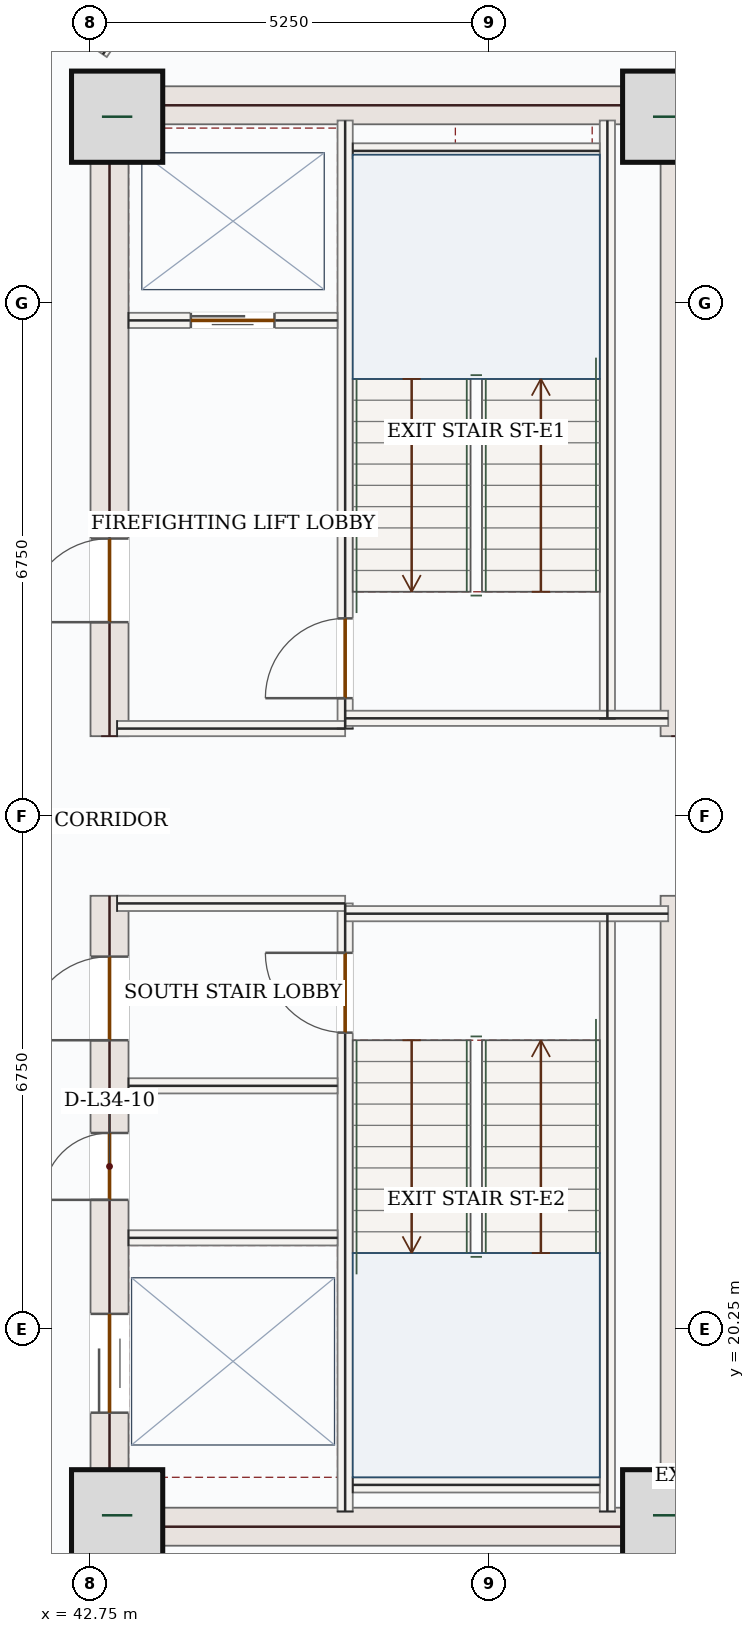
"""IFC4 building model, lengths in metres.
Left out: names, types, materials, properties, quantities, classifications, styles, units other than length and angle.
Written with IfcOpenShell. Run it as: python <this file> out.ifc"""

import sys

from ifc_helpers import new_model, si_unit, direction, frame, frame_2d, origin, origin_2d, place, context, subcontext, project, spatial, rectangle, extrude, source, transform, mapped, element, fill, save


model = new_model("IFC4")
c1 = context("Model", 3, precision=1e-05, world=origin(), true_north=direction((0.0, 1.0)))
c2 = subcontext(c1, "Body", "Model", "MODEL_VIEW")
j1 = project(units=[si_unit("LENGTHUNIT", "METRE"), si_unit("PLANEANGLEUNIT", "RADIAN")], contexts=[c1])
p1 = place(None, origin())
s1 = spatial("IfcSite", under=j1, at=p1, CompositionType="ELEMENT")
p2 = place(p1, origin())
s2 = spatial("IfcBuilding", under=s1, at=p2, CompositionType="ELEMENT")
p3 = place(p2, frame((0.0, 0.0, 151.2)))
s3 = spatial("IfcBuildingStorey", under=s2, at=p3, CompositionType="ELEMENT", Elevation=151.2)
p4 = place(p3, frame((43.0, 17.4, 0.0), z_axis=(0.0, 0.0, 1.0), x_axis=(0.0, 1.0, 0.0)))
e1 = element("IfcWall", 1, at=p4, inside=s3, PredefinedType="SHEAR", context=c2, shape_type="SweptSolid", body=[
    extrude(rectangle(XDim=8.55, YDim=0.5, at=frame_2d((4.275, 0.0))), origin(), (0.0, 0.0, 1.0), 3.62),
])
p5 = place(p4, frame((6.65, 0.0, 0.0)))
e2 = element("IfcOpeningElement", 2, at=p5, cuts=e1, PredefinedType="OPENING", context=c2, shape_type="SweptSolid", body=[
    extrude(rectangle(XDim=1.1, YDim=2.2, at=frame_2d((0.55, 1.1))), frame((0.0, 0.26, 0.0), z_axis=(0.0, -1.0, 0.0), x_axis=(1.0, 0.0, 0.0)), (0.0, 0.0, 1.0), 0.52),
])
p6 = place(p4, frame((1.75, 0.0, 0.0)))
e3 = element("IfcOpeningElement", 3, at=p6, cuts=e1, PredefinedType="OPENING", context=c2, shape_type="SweptSolid", body=[
    extrude(rectangle(XDim=1.3, YDim=2.2, at=frame_2d((0.65, 1.1))), frame((0.0, 0.26, 0.0), z_axis=(0.0, -1.0, 0.0), x_axis=(1.0, 0.0, 0.0)), (0.0, 0.0, 1.0), 0.52),
])
p7 = place(p4, frame((4.55, 0.0, 0.0)))
e4 = element("IfcOpeningElement", 4, at=p7, cuts=e1, PredefinedType="OPENING", context=c2, shape_type="SweptSolid", body=[
    extrude(rectangle(XDim=0.88, YDim=2.1, at=frame_2d((0.44, 1.05))), frame((0.0, 0.26, 0.0), z_axis=(0.0, -1.0, 0.0), x_axis=(1.0, 0.0, 0.0)), (0.0, 0.0, 1.0), 0.52),
])
p8 = place(p3, frame((43.0, 28.05, 0.0), z_axis=(0.0, 0.0, 1.0), x_axis=(0.0, 1.0, 0.0)))
e5 = element("IfcWall", 5, at=p8, inside=s3, PredefinedType="SHEAR", context=c2, shape_type="SweptSolid", body=[
    extrude(rectangle(XDim=8.55, YDim=0.5, at=frame_2d((4.275, 0.0))), origin(), (0.0, 0.0, 1.0), 3.62),
])
p9 = place(p8, frame((1.5, 0.0, 0.0)))
e6 = element("IfcOpeningElement", 6, at=p9, cuts=e5, PredefinedType="OPENING", context=c2, shape_type="SweptSolid", body=[
    extrude(rectangle(XDim=1.1, YDim=2.2, at=frame_2d((0.55, 1.1))), frame((0.0, 0.26, 0.0), z_axis=(0.0, -1.0, 0.0), x_axis=(1.0, 0.0, 0.0)), (0.0, 0.0, 1.0), 0.52),
])
m1 = source(origin(), c2, "Body", "SweptSolid", [
    extrude(rectangle(XDim=8.55, YDim=0.5, at=frame_2d((4.275, 0.0))), origin(), (0.0, 0.0, 1.0), 3.62),
])
for number, where, z_axis, x_axis in (
    (7, (50.5, 17.4, 0.0), (0.0, 0.0, 1.0), (0.0, 1.0, 0.0)),
    (8, (50.5, 28.05, 0.0), (0.0, 0.0, 1.0), (0.0, 1.0, 0.0)),
):
    element("IfcWall", number, at=place(p3, frame(where, z_axis=z_axis, x_axis=x_axis)), inside=s3, PredefinedType="SHEAR", context=c2, shape_type="MappedRepresentation", body=[
        mapped(m1, transform((0.0, 0.0, 0.0), x_axis=(1.0, 0.0, 0.0), y_axis=(0.0, 1.0, 0.0), z_axis=(0.0, 0.0, 1.0), scale=1.0)),
    ])
m2 = source(origin(), c2, "Body", "SweptSolid", [
    extrude(rectangle(XDim=7.0, YDim=0.5, at=frame_2d((3.5, 0.0))), origin(), (0.0, 0.0, 1.0), 3.62),
])
for number, where, z_axis, x_axis in (
    (9, (43.25, 17.65, 0.0), (0.0, 0.0, 1.0), (1.0, 0.0, 0.0)),
    (10, (43.25, 36.35, 0.0), (0.0, 0.0, 1.0), (1.0, 0.0, 0.0)),
):
    element("IfcWall", number, at=place(p3, frame(where, z_axis=z_axis, x_axis=x_axis)), inside=s3, PredefinedType="SHEAR", context=c2, shape_type="MappedRepresentation", body=[
        mapped(m2, transform((0.0, 0.0, 0.0), x_axis=(1.0, 0.0, 0.0), y_axis=(0.0, 1.0, 0.0), z_axis=(0.0, 0.0, 1.0), scale=1.0)),
    ])
m3 = source(origin(), c2, "Body", "SweptSolid", [
    extrude(rectangle(XDim=1.2, YDim=1.2, at=origin_2d()), origin(), (0.0, 0.0, 1.0), 3.9),
])
for number, where, z_axis, x_axis in (
    (11, (43.1, 17.8, 0.0), (0.0, 0.0, 1.0), (1.0, 0.0, 0.0)),
    (12, (50.35, 17.8, 0.0), (0.0, 0.0, 1.0), (1.0, 0.0, 0.0)),
    (13, (43.1, 36.2, 0.0), (0.0, 0.0, 1.0), (1.0, 0.0, 0.0)),
    (14, (50.35, 36.2, 0.0), (0.0, 0.0, 1.0), (1.0, 0.0, 0.0)),
):
    element("IfcColumn", number, at=place(p3, frame(where, z_axis=z_axis, x_axis=x_axis)), inside=s3, PredefinedType="COLUMN", context=c2, shape_type="MappedRepresentation", body=[
        mapped(m3, transform((0.0, 0.0, 0.0), x_axis=(1.0, 0.0, 0.0), y_axis=(0.0, 1.0, 0.0), z_axis=(0.0, 0.0, 1.0), scale=1.0)),
    ])
m4 = source(origin(), c2, "Body", "SweptSolid", [
    extrude(rectangle(XDim=5.258, YDim=0.28, at=frame_2d((2.629, 0.0))), origin(), (0.0, 0.0, 1.0), 3.62),
])
p10 = place(p3, frame((53.06, 18.458, 0.0), z_axis=(0.0, 0.0, 1.0), x_axis=(-0.707106781187, -0.707106781187, 0.0)))
e15 = element("IfcWall", 15, at=p10, inside=s3, PredefinedType="SOLIDWALL", context=c2, shape_type="MappedRepresentation", body=[
    mapped(m4, transform((0.0, 0.0, 0.0), x_axis=(1.0, 0.0, 0.0), y_axis=(0.0, 1.0, 0.0), z_axis=(0.0, 0.0, 1.0), scale=1.0)),
])
m5 = source(origin(), c2, "Body", "SweptSolid", [
    extrude(rectangle(XDim=3.544, YDim=0.28, at=frame_2d((1.772, 0.0))), origin(), (0.0, 0.0, 1.0), 3.62),
])
p11 = place(p3, frame((49.342, 39.26, 0.0), z_axis=(0.0, 0.0, 1.0), x_axis=(0.707106781187, -0.707106781187, 0.0)))
e16 = element("IfcWall", 16, at=p11, inside=s3, PredefinedType="SOLIDWALL", context=c2, shape_type="MappedRepresentation", body=[
    mapped(m5, transform((0.0, 0.0, 0.0), x_axis=(1.0, 0.0, 0.0), y_axis=(0.0, 1.0, 0.0), z_axis=(0.0, 0.0, 1.0), scale=1.0)),
])
m6 = source(origin(), c2, "Body", "SweptSolid", [
    extrude(rectangle(XDim=7.87, YDim=0.2, at=frame_2d((3.935, 0.0))), origin(), (0.0, 0.0, 1.0), 3.62),
])
for number, where, z_axis, x_axis in (
    (17, (49.55, 17.85, 0.0), (0.0, 0.0, 1.0), (0.0, 1.0, 0.0)),
    (18, (49.55, 28.28, 0.0), (0.0, 0.0, 1.0), (0.0, 1.0, 0.0)),
):
    element("IfcWall", number, at=place(p3, frame(where, z_axis=z_axis, x_axis=x_axis)), inside=s3, PredefinedType="SOLIDWALL", context=c2, shape_type="MappedRepresentation", body=[
        mapped(m6, transform((0.0, 0.0, 0.0), x_axis=(1.0, 0.0, 0.0), y_axis=(0.0, 1.0, 0.0), z_axis=(0.0, 0.0, 1.0), scale=1.0)),
    ])
p12 = place(p3, frame((46.1, 17.85, 0.0), z_axis=(0.0, 0.0, 1.0), x_axis=(0.0, 1.0, 0.0)))
e19 = element("IfcWall", 19, at=p12, inside=s3, PredefinedType="SOLIDWALL", context=c2, shape_type="SweptSolid", body=[
    extrude(rectangle(XDim=8.0, YDim=0.2, at=frame_2d((4.0, 0.0))), origin(), (0.0, 0.0, 1.0), 3.62),
])
p13 = place(p12, frame((6.3, 0.0, 0.0)))
e20 = element("IfcOpeningElement", 20, at=p13, cuts=e19, PredefinedType="OPENING", context=c2, shape_type="SweptSolid", body=[
    extrude(rectangle(XDim=1.05, YDim=2.15, at=frame_2d((0.525, 1.075))), frame((0.0, 0.11, 0.0), z_axis=(0.0, -1.0, 0.0), x_axis=(1.0, 0.0, 0.0)), (0.0, 0.0, 1.0), 0.22),
])
p14 = place(p3, frame((46.1, 28.15, 0.0), z_axis=(0.0, 0.0, 1.0), x_axis=(0.0, 1.0, 0.0)))
e21 = element("IfcWall", 21, at=p14, inside=s3, PredefinedType="SOLIDWALL", context=c2, shape_type="SweptSolid", body=[
    extrude(rectangle(XDim=8.0, YDim=0.2, at=frame_2d((4.0, 0.0))), origin(), (0.0, 0.0, 1.0), 3.62),
])
p15 = place(p14, frame((0.4, 0.0, 0.0)))
e22 = element("IfcOpeningElement", 22, at=p15, cuts=e21, PredefinedType="OPENING", context=c2, shape_type="SweptSolid", body=[
    extrude(rectangle(XDim=1.05, YDim=2.15, at=frame_2d((0.525, 1.075))), frame((0.0, 0.11, 0.0), z_axis=(0.0, -1.0, 0.0), x_axis=(1.0, 0.0, 0.0)), (0.0, 0.0, 1.0), 0.22),
])
m7 = source(origin(), c2, "Body", "SweptSolid", [
    extrude(rectangle(XDim=3.0, YDim=0.2, at=frame_2d((1.5, 0.0))), origin(), (0.0, 0.0, 1.0), 3.62),
])
p16 = place(p3, frame((43.1, 25.85, 0.0), z_axis=(0.0, 0.0, 1.0), x_axis=(1.0, 0.0, 0.0)))
e23 = element("IfcWall", 23, at=p16, inside=s3, PredefinedType="SOLIDWALL", context=c2, shape_type="MappedRepresentation", body=[
    mapped(m7, transform((0.0, 0.0, 0.0), x_axis=(1.0, 0.0, 0.0), y_axis=(0.0, 1.0, 0.0), z_axis=(0.0, 0.0, 1.0), scale=1.0)),
])
m8 = source(origin(), c2, "Body", "SweptSolid", [
    extrude(rectangle(XDim=4.25, YDim=0.2, at=frame_2d((2.125, 0.0))), origin(), (0.0, 0.0, 1.0), 3.62),
])
p17 = place(p3, frame((46.1, 25.715, 0.0), z_axis=(0.0, 0.0, 1.0), x_axis=(1.0, 0.0, 0.0)))
e24 = element("IfcWall", 24, at=p17, inside=s3, PredefinedType="SOLIDWALL", context=c2, shape_type="MappedRepresentation", body=[
    mapped(m8, transform((0.0, 0.0, 0.0), x_axis=(1.0, 0.0, 0.0), y_axis=(0.0, 1.0, 0.0), z_axis=(0.0, 0.0, 1.0), scale=1.0)),
])
p18 = place(p3, frame((43.1, 28.15, 0.0), z_axis=(0.0, 0.0, 1.0), x_axis=(1.0, 0.0, 0.0)))
e25 = element("IfcWall", 25, at=p18, inside=s3, PredefinedType="SOLIDWALL", context=c2, shape_type="MappedRepresentation", body=[
    mapped(m7, transform((0.0, 0.0, 0.0), x_axis=(1.0, 0.0, 0.0), y_axis=(0.0, 1.0, 0.0), z_axis=(0.0, 0.0, 1.0), scale=1.0)),
])
p19 = place(p3, frame((46.1, 28.285, 0.0), z_axis=(0.0, 0.0, 1.0), x_axis=(1.0, 0.0, 0.0)))
e26 = element("IfcWall", 26, at=p19, inside=s3, PredefinedType="SOLIDWALL", context=c2, shape_type="MappedRepresentation", body=[
    mapped(m8, transform((0.0, 0.0, 0.0), x_axis=(1.0, 0.0, 0.0), y_axis=(0.0, 1.0, 0.0), z_axis=(0.0, 0.0, 1.0), scale=1.0)),
])
m9 = source(origin(), c2, "Body", "SweptSolid", [
    extrude(rectangle(XDim=3.25, YDim=0.2, at=frame_2d((1.625, 0.0))), origin(), (0.0, 0.0, 1.0), 3.62),
])
for number, where, z_axis, x_axis in (
    (27, (46.2, 35.75, 0.0), (0.0, 0.0, 1.0), (1.0, 0.0, 0.0)),
    (28, (46.2, 18.2, 0.0), (0.0, 0.0, 1.0), (1.0, 0.0, 0.0)),
):
    element("IfcWall", number, at=place(p3, frame(where, z_axis=z_axis, x_axis=x_axis)), inside=s3, PredefinedType="SOLIDWALL", context=c2, shape_type="MappedRepresentation", body=[
        mapped(m9, transform((0.0, 0.0, 0.0), x_axis=(1.0, 0.0, 0.0), y_axis=(0.0, 1.0, 0.0), z_axis=(0.0, 0.0, 1.0), scale=1.0)),
    ])
p20 = place(p3, frame((43.25, 33.52, 0.0), z_axis=(0.0, 0.0, 1.0), x_axis=(1.0, 0.0, 0.0)))
e29 = element("IfcWall", 29, at=p20, inside=s3, PredefinedType="SOLIDWALL", context=c2, shape_type="SweptSolid", body=[
    extrude(rectangle(XDim=2.75, YDim=0.2, at=frame_2d((1.375, 0.0))), origin(), (0.0, 0.0, 1.0), 3.62),
])
p21 = place(p20, frame((0.82, 0.0, 0.0)))
e30 = element("IfcOpeningElement", 30, at=p21, cuts=e29, PredefinedType="OPENING", context=c2, shape_type="SweptSolid", body=[
    extrude(rectangle(XDim=1.1, YDim=2.15, at=frame_2d((0.55, 1.075))), frame((0.0, 0.11, 0.0), z_axis=(0.0, -1.0, 0.0), x_axis=(1.0, 0.0, 0.0)), (0.0, 0.0, 1.0), 0.22),
])
m10 = source(origin(), c2, "Body", "SweptSolid", [
    extrude(rectangle(XDim=2.75, YDim=0.2, at=frame_2d((1.375, 0.0))), origin(), (0.0, 0.0, 1.0), 3.62),
])
for number, where, z_axis, x_axis in (
    (31, (43.25, 23.45, 0.0), (0.0, 0.0, 1.0), (1.0, 0.0, 0.0)),
    (32, (43.25, 21.45, 0.0), (0.0, 0.0, 1.0), (1.0, 0.0, 0.0)),
):
    element("IfcWall", number, at=place(p3, frame(where, z_axis=z_axis, x_axis=x_axis)), inside=s3, PredefinedType="SOLIDWALL", context=c2, shape_type="MappedRepresentation", body=[
        mapped(m10, transform((0.0, 0.0, 0.0), x_axis=(1.0, 0.0, 0.0), y_axis=(0.0, 1.0, 0.0), z_axis=(0.0, 0.0, 1.0), scale=1.0)),
    ])
m11 = source(origin(), c2, "Body", "SweptSolid", [
    extrude(rectangle(XDim=2.53, YDim=0.125, at=frame_2d((1.265, 0.0))), origin(), (0.0, 0.0, 1.0), 3.62),
])
p22 = place(p3, frame((44.33, 39.115, 0.0), z_axis=(0.0, 0.0, 1.0), x_axis=(-0.560455418396, -0.82818459536, 0.0)))
e33 = element("IfcWall", 33, at=p22, inside=s3, PredefinedType="PARTITIONING", context=c2, shape_type="MappedRepresentation", body=[
    mapped(m11, transform((0.0, 0.0, 0.0), x_axis=(1.0, 0.0, 0.0), y_axis=(0.0, 1.0, 0.0), z_axis=(0.0, 0.0, 1.0), scale=1.0)),
])
m12 = source(origin(), c2, "Body", "SweptSolid", [
    extrude(rectangle(XDim=1.05, YDim=2.15, at=frame_2d((0.525, 1.075))), frame((0.0, 0.025, 0.0), z_axis=(0.0, -1.0, 0.0), x_axis=(1.0, 0.0, 0.0)), (0.0, 0.0, 1.0), 0.05),
])
p23 = place(p15, origin())
e34 = element("IfcDoor", 34, at=p23, inside=s3, OperationType="SINGLE_SWING_LEFT", PredefinedType="DOOR", context=c2, shape_type="MappedRepresentation", body=[
    mapped(m12, transform((0.0, 0.0, 0.0), x_axis=(1.0, 0.0, 0.0), y_axis=(0.0, 1.0, 0.0), z_axis=(0.0, 0.0, 1.0), scale=1.0)),
])
fill(e22, e34)
p24 = place(p13, origin())
e35 = element("IfcDoor", 35, at=p24, inside=s3, OperationType="SINGLE_SWING_RIGHT", PredefinedType="DOOR", context=c2, shape_type="MappedRepresentation", body=[
    mapped(m12, transform((0.0, 0.0, 0.0), x_axis=(1.0, 0.0, 0.0), y_axis=(0.0, 1.0, 0.0), z_axis=(0.0, 0.0, 1.0), scale=1.0)),
])
fill(e20, e35)
m13 = source(origin(), c2, "Body", "SweptSolid", [
    extrude(rectangle(XDim=1.1, YDim=2.15, at=frame_2d((0.55, 1.075))), frame((0.0, 0.025, 0.0), z_axis=(0.0, -1.0, 0.0), x_axis=(1.0, 0.0, 0.0)), (0.0, 0.0, 1.0), 0.05),
])
p25 = place(p21, origin())
e36 = element("IfcDoor", 36, at=p25, inside=s3, OperationType="DOUBLE_DOOR_SLIDING", PredefinedType="DOOR", context=c2, shape_type="MappedRepresentation", body=[
    mapped(m13, transform((0.0, 0.0, 0.0), x_axis=(1.0, 0.0, 0.0), y_axis=(0.0, 1.0, 0.0), z_axis=(0.0, 0.0, 1.0), scale=1.0)),
])
fill(e30, e36)
m14 = source(origin(), c2, "Body", "SweptSolid", [
    extrude(rectangle(XDim=1.1, YDim=2.2, at=frame_2d((0.55, 1.1))), frame((0.0, 0.025, 0.0), z_axis=(0.0, -1.0, 0.0), x_axis=(1.0, 0.0, 0.0)), (0.0, 0.0, 1.0), 0.05),
])
p26 = place(p9, origin())
e37 = element("IfcDoor", 37, at=p26, inside=s3, OperationType="SINGLE_SWING_LEFT", PredefinedType="DOOR", context=c2, shape_type="MappedRepresentation", body=[
    mapped(m14, transform((0.0, 0.0, 0.0), x_axis=(1.0, 0.0, 0.0), y_axis=(0.0, 1.0, 0.0), z_axis=(0.0, 0.0, 1.0), scale=1.0)),
])
fill(e6, e37)
p27 = place(p5, origin())
e38 = element("IfcDoor", 38, at=p27, inside=s3, OperationType="SINGLE_SWING_LEFT", PredefinedType="DOOR", context=c2, shape_type="MappedRepresentation", body=[
    mapped(m14, transform((0.0, 0.0, 0.0), x_axis=(1.0, 0.0, 0.0), y_axis=(0.0, 1.0, 0.0), z_axis=(0.0, 0.0, 1.0), scale=1.0)),
])
fill(e2, e38)
m15 = source(origin(), c2, "Body", "SweptSolid", [
    extrude(rectangle(XDim=1.3, YDim=2.2, at=frame_2d((0.65, 1.1))), frame((0.0, 0.025, 0.0), z_axis=(0.0, -1.0, 0.0), x_axis=(1.0, 0.0, 0.0)), (0.0, 0.0, 1.0), 0.05),
])
p28 = place(p6, origin())
e39 = element("IfcDoor", 39, at=p28, inside=s3, OperationType="DOUBLE_DOOR_SLIDING", PredefinedType="DOOR", context=c2, shape_type="MappedRepresentation", body=[
    mapped(m15, transform((0.0, 0.0, 0.0), x_axis=(1.0, 0.0, 0.0), y_axis=(0.0, 1.0, 0.0), z_axis=(0.0, 0.0, 1.0), scale=1.0)),
])
fill(e3, e39)
m16 = source(origin(), c2, "Body", "SweptSolid", [
    extrude(rectangle(XDim=0.88, YDim=2.1, at=frame_2d((0.44, 1.05))), frame((0.0, 0.025, 0.0), z_axis=(0.0, -1.0, 0.0), x_axis=(1.0, 0.0, 0.0)), (0.0, 0.0, 1.0), 0.05),
])
p29 = place(p7, origin())
e40 = element("IfcDoor", 40, at=p29, inside=s3, OperationType="SINGLE_SWING_LEFT", PredefinedType="DOOR", context=c2, shape_type="MappedRepresentation", body=[
    mapped(m16, transform((0.0, 0.0, 0.0), x_axis=(1.0, 0.0, 0.0), y_axis=(0.0, 1.0, 0.0), z_axis=(0.0, 0.0, 1.0), scale=1.0)),
])
fill(e4, e40)
save(model, sys.argv[1])
